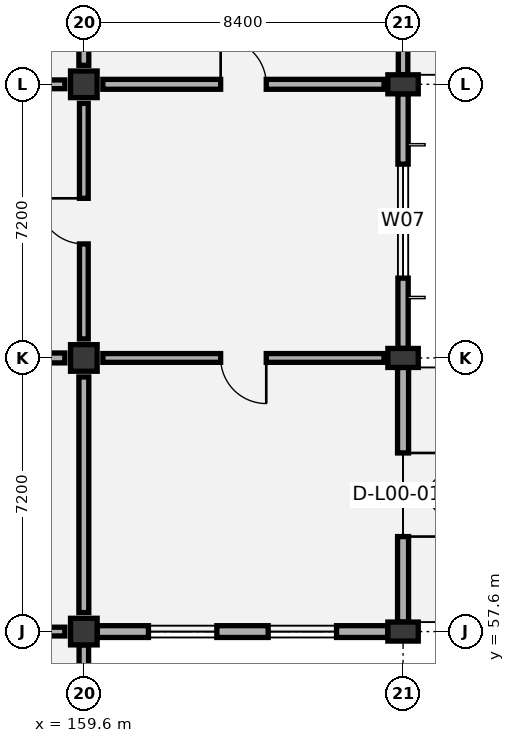
"""IFC4 building model, lengths in metres.
Left out: names, types, materials, properties, quantities, classifications, styles, units other than length and angle.
Written with IfcOpenShell. Run it as: python <this file> out.ifc"""

import sys

from ifc_helpers import new_model, si_unit, direction, frame, frame_2d, origin, origin_2d, place, context, subcontext, project, spatial, rectangle, extrude, element, fill, save


model = new_model("IFC4")
c1 = context("Model", 3, precision=1e-05, world=origin(), true_north=direction((0.0, 1.0)))
c2 = subcontext(c1, "Body", "Model", "MODEL_VIEW")
j1 = project(units=[si_unit("LENGTHUNIT", "METRE"), si_unit("PLANEANGLEUNIT", "RADIAN")], contexts=[c1])
p1 = place(None, origin())
s1 = spatial("IfcSite", under=j1, at=p1, CompositionType="ELEMENT")
p2 = place(p1, origin())
s2 = spatial("IfcBuilding", under=s1, at=p2, CompositionType="ELEMENT")
p3 = place(p2, origin())
s3 = spatial("IfcBuildingStorey", under=s2, at=p3, CompositionType="ELEMENT", Elevation=0.0)
for number, where, z_axis, x_axis in (
    (1, (159.6, 57.6, 0.0), (0.0, 0.0, 1.0), (1.0, 0.0, 0.0)),
    (2, (159.6, 64.8, 0.0), (0.0, 0.0, 1.0), (1.0, 0.0, 0.0)),
    (3, (159.6, 72.0, 0.0), (0.0, 0.0, 1.0), (1.0, 0.0, 0.0)),
):
    element("IfcColumn", number, at=place(p3, frame(where, z_axis=z_axis, x_axis=x_axis)), inside=s3, PredefinedType="COLUMN", context=c2, shape_type="SweptSolid", body=[
        extrude(rectangle(XDim=0.7, YDim=0.7, at=origin_2d()), origin(), (0.0, 0.0, 1.0), 6.0),
    ])
for number, where, z_axis, x_axis in (
    (4, (168.0, 57.6, 0.0), (0.0, 0.0, 1.0), (0.0, 1.0, 0.0)),
    (5, (168.0, 64.8, 0.0), (0.0, 0.0, 1.0), (0.0, 1.0, 0.0)),
    (6, (168.0, 72.0, 0.0), (0.0, 0.0, 1.0), (0.0, 1.0, 0.0)),
):
    element("IfcColumn", number, at=place(p3, frame(where, z_axis=z_axis, x_axis=x_axis)), inside=s3, PredefinedType="COLUMN", context=c2, shape_type="SweptSolid", body=[
        extrude(rectangle(XDim=0.5, YDim=0.8, at=origin_2d()), origin(), (0.0, 0.0, 1.0), 6.0),
    ])
p4 = place(p3, frame((159.6, 50.75, 0.0), z_axis=(0.0, 0.0, 1.0), x_axis=(0.0, 1.0, 0.0)))
e7 = element("IfcWall", 7, at=p4, inside=s3, PredefinedType="SOLIDWALL", context=c2, shape_type="SweptSolid", body=[
    extrude(rectangle(XDim=6.5, YDim=0.25, at=frame_2d((3.25, 0.0))), origin(), (0.0, 0.0, 1.0), 5.02),
])
p5 = place(p4, frame((0.967, 0.0, 0.9)))
e8 = element("IfcOpeningElement", 8, at=p5, cuts=e7, PredefinedType="OPENING", context=c2, shape_type="SweptSolid", body=[
    extrude(rectangle(XDim=1.8, YDim=2.1, at=frame_2d((0.9, 1.05))), frame((0.0, 0.135, 0.0), z_axis=(0.0, -1.0, 0.0), x_axis=(1.0, 0.0, 0.0)), (0.0, 0.0, 1.0), 0.27),
])
p6 = place(p4, frame((3.733, 0.0, 0.9)))
e9 = element("IfcOpeningElement", 9, at=p6, cuts=e7, PredefinedType="OPENING", context=c2, shape_type="SweptSolid", body=[
    extrude(rectangle(XDim=1.8, YDim=2.1, at=frame_2d((0.9, 1.05))), frame((0.0, 0.135, 0.0), z_axis=(0.0, -1.0, 0.0), x_axis=(1.0, 0.0, 0.0)), (0.0, 0.0, 1.0), 0.27),
])
p7 = place(p3, frame((159.95, 57.6, 0.0), z_axis=(0.0, 0.0, 1.0), x_axis=(1.0, 0.0, 0.0)))
e10 = element("IfcWall", 10, at=p7, inside=s3, PredefinedType="SOLIDWALL", context=c2, shape_type="SweptSolid", body=[
    extrude(rectangle(XDim=7.65, YDim=0.31, at=frame_2d((3.825, 0.0))), origin(), (0.0, 0.0, 1.0), 5.02),
])
p8 = place(p7, frame((1.35, 0.0, 0.9)))
e11 = element("IfcOpeningElement", 11, at=p8, cuts=e10, PredefinedType="OPENING", context=c2, shape_type="SweptSolid", body=[
    extrude(rectangle(XDim=1.8, YDim=2.1, at=frame_2d((0.9, 1.05))), frame((0.0, 0.165, 0.0), z_axis=(0.0, -1.0, 0.0), x_axis=(1.0, 0.0, 0.0)), (0.0, 0.0, 1.0), 0.33),
])
p9 = place(p7, frame((4.5, 0.0, 0.9)))
e12 = element("IfcOpeningElement", 12, at=p9, cuts=e10, PredefinedType="OPENING", context=c2, shape_type="SweptSolid", body=[
    extrude(rectangle(XDim=1.8, YDim=2.1, at=frame_2d((0.9, 1.05))), frame((0.0, 0.165, 0.0), z_axis=(0.0, -1.0, 0.0), x_axis=(1.0, 0.0, 0.0)), (0.0, 0.0, 1.0), 0.33),
])
p10 = place(p3, frame((168.0, 57.85, 0.0), z_axis=(0.0, 0.0, 1.0), x_axis=(0.0, 1.0, 0.0)))
e13 = element("IfcWall", 13, at=p10, inside=s3, PredefinedType="SOLIDWALL", context=c2, shape_type="SweptSolid", body=[
    extrude(rectangle(XDim=6.7, YDim=0.29, at=frame_2d((3.35, 0.0))), origin(), (0.0, 0.0, 1.0), 5.02),
])
p11 = place(p10, frame((2.25, 0.0, 0.0)))
e14 = element("IfcOpeningElement", 14, at=p11, cuts=e13, PredefinedType="OPENING", context=c2, shape_type="SweptSolid", body=[
    extrude(rectangle(XDim=2.2, YDim=2.45, at=frame_2d((1.1, 1.225))), frame((0.0, 0.155, 0.0), z_axis=(0.0, -1.0, 0.0), x_axis=(1.0, 0.0, 0.0)), (0.0, 0.0, 1.0), 0.31),
])
p12 = place(p3, frame((168.0, 65.05, 0.0), z_axis=(0.0, 0.0, 1.0), x_axis=(0.0, 1.0, 0.0)))
e15 = element("IfcWall", 15, at=p12, inside=s3, PredefinedType="SOLIDWALL", context=c2, shape_type="SweptSolid", body=[
    extrude(rectangle(XDim=6.7, YDim=0.27, at=frame_2d((3.35, 0.0))), origin(), (0.0, 0.0, 1.0), 5.02),
])
p13 = place(p12, frame((1.85, 0.0, 0.9)))
e16 = element("IfcOpeningElement", 16, at=p13, cuts=e15, PredefinedType="OPENING", context=c2, shape_type="SweptSolid", body=[
    extrude(rectangle(XDim=3.0, YDim=2.1, at=frame_2d((1.5, 1.05))), frame((0.0, 0.145, 0.0), z_axis=(0.0, -1.0, 0.0), x_axis=(1.0, 0.0, 0.0)), (0.0, 0.0, 1.0), 0.29),
])
p14 = place(p3, frame((168.0, 72.25, 0.0), z_axis=(0.0, 0.0, 1.0), x_axis=(0.0, 1.0, 0.0)))
e17 = element("IfcWall", 17, at=p14, inside=s3, PredefinedType="SOLIDWALL", context=c2, shape_type="SweptSolid", body=[
    extrude(rectangle(XDim=6.7, YDim=0.25, at=frame_2d((3.35, 0.0))), origin(), (0.0, 0.0, 1.0), 5.02),
])
p15 = place(p14, frame((2.35, 0.0, 0.0)))
e18 = element("IfcOpeningElement", 18, at=p15, cuts=e17, PredefinedType="OPENING", context=c2, shape_type="SweptSolid", body=[
    extrude(rectangle(XDim=2.0, YDim=2.4, at=frame_2d((1.0, 1.2))), frame((0.0, 0.135, 0.0), z_axis=(0.0, -1.0, 0.0), x_axis=(1.0, 0.0, 0.0)), (0.0, 0.0, 1.0), 0.27),
])
p16 = place(p3, frame((168.0, 50.52, 0.0), z_axis=(0.0, 0.0, 1.0), x_axis=(0.0, 1.0, 0.0)))
e19 = element("IfcWall", 19, at=p16, inside=s3, PredefinedType="PARAPET", context=c2, shape_type="SweptSolid", body=[
    extrude(rectangle(XDim=6.96, YDim=0.22, at=frame_2d((3.48, 0.0))), origin(), (0.0, 0.0, 1.0), 1.15),
])
p17 = place(p3, frame((151.7, 57.6, 0.0), z_axis=(0.0, 0.0, 1.0), x_axis=(1.0, 0.0, 0.0)))
e20 = element("IfcWall", 20, at=p17, inside=s3, PredefinedType="PARTITIONING", context=c2, shape_type="SweptSolid", body=[
    extrude(rectangle(XDim=7.4, YDim=0.23, at=frame_2d((3.7, 0.0))), origin(), (0.0, 0.0, 1.0), 4.87),
])
p18 = place(p17, frame((3.1, 0.0, 0.0)))
e21 = element("IfcOpeningElement", 21, at=p18, cuts=e20, PredefinedType="OPENING", context=c2, shape_type="SweptSolid", body=[
    extrude(rectangle(XDim=1.2, YDim=2.1, at=frame_2d((0.6, 1.05))), frame((0.0, 0.125, 0.0), z_axis=(0.0, -1.0, 0.0), x_axis=(1.0, 0.0, 0.0)), (0.0, 0.0, 1.0), 0.25),
])
p19 = place(p3, frame((159.6, 58.1, 0.0), z_axis=(0.0, 0.0, 1.0), x_axis=(0.0, 1.0, 0.0)))
e22 = element("IfcWall", 22, at=p19, inside=s3, PredefinedType="PARTITIONING", context=c2, shape_type="SweptSolid", body=[
    extrude(rectangle(XDim=6.2, YDim=0.26, at=frame_2d((3.1, 0.0))), origin(), (0.0, 0.0, 1.0), 4.92),
])
p20 = place(p3, frame((151.7, 64.8, 0.0), z_axis=(0.0, 0.0, 1.0), x_axis=(1.0, 0.0, 0.0)))
e23 = element("IfcWall", 23, at=p20, inside=s3, PredefinedType="PARTITIONING", context=c2, shape_type="SweptSolid", body=[
    extrude(rectangle(XDim=7.4, YDim=0.26, at=frame_2d((3.7, 0.0))), origin(), (0.0, 0.0, 1.0), 4.87),
])
p21 = place(p20, frame((3.1, 0.0, 0.0)))
e24 = element("IfcOpeningElement", 24, at=p21, cuts=e23, PredefinedType="OPENING", context=c2, shape_type="SweptSolid", body=[
    extrude(rectangle(XDim=1.2, YDim=2.1, at=frame_2d((0.6, 1.05))), frame((0.0, 0.14, 0.0), z_axis=(0.0, -1.0, 0.0), x_axis=(1.0, 0.0, 0.0)), (0.0, 0.0, 1.0), 0.28),
])
p22 = place(p3, frame((159.6, 65.3, 0.0), z_axis=(0.0, 0.0, 1.0), x_axis=(0.0, 1.0, 0.0)))
e25 = element("IfcWall", 25, at=p22, inside=s3, PredefinedType="PARTITIONING", context=c2, shape_type="SweptSolid", body=[
    extrude(rectangle(XDim=6.2, YDim=0.23, at=frame_2d((3.1, 0.0))), origin(), (0.0, 0.0, 1.0), 5.17),
])
p23 = place(p22, frame((2.5, 0.0, 0.0)))
e26 = element("IfcOpeningElement", 26, at=p23, cuts=e25, PredefinedType="OPENING", context=c2, shape_type="SweptSolid", body=[
    extrude(rectangle(XDim=1.2, YDim=2.1, at=frame_2d((0.6, 1.05))), frame((0.0, 0.125, 0.0), z_axis=(0.0, -1.0, 0.0), x_axis=(1.0, 0.0, 0.0)), (0.0, 0.0, 1.0), 0.25),
])
p24 = place(p3, frame((151.7, 72.0, 0.0), z_axis=(0.0, 0.0, 1.0), x_axis=(1.0, 0.0, 0.0)))
e27 = element("IfcWall", 27, at=p24, inside=s3, PredefinedType="PARTITIONING", context=c2, shape_type="SweptSolid", body=[
    extrude(rectangle(XDim=7.4, YDim=0.23, at=frame_2d((3.7, 0.0))), origin(), (0.0, 0.0, 1.0), 4.87),
])
p25 = place(p24, frame((3.1, 0.0, 0.0)))
e28 = element("IfcOpeningElement", 28, at=p25, cuts=e27, PredefinedType="OPENING", context=c2, shape_type="SweptSolid", body=[
    extrude(rectangle(XDim=1.2, YDim=2.1, at=frame_2d((0.6, 1.05))), frame((0.0, 0.125, 0.0), z_axis=(0.0, -1.0, 0.0), x_axis=(1.0, 0.0, 0.0)), (0.0, 0.0, 1.0), 0.25),
])
p26 = place(p3, frame((159.6, 72.5, 0.0), z_axis=(0.0, 0.0, 1.0), x_axis=(0.0, 1.0, 0.0)))
e29 = element("IfcWall", 29, at=p26, inside=s3, PredefinedType="PARTITIONING", context=c2, shape_type="SweptSolid", body=[
    extrude(rectangle(XDim=6.2, YDim=0.26, at=frame_2d((3.1, 0.0))), origin(), (0.0, 0.0, 1.0), 4.92),
])
p27 = place(p3, frame((160.1, 64.8, 0.0), z_axis=(0.0, 0.0, 1.0), x_axis=(1.0, 0.0, 0.0)))
e30 = element("IfcWall", 30, at=p27, inside=s3, PredefinedType="PARTITIONING", context=c2, shape_type="SweptSolid", body=[
    extrude(rectangle(XDim=7.4, YDim=0.23, at=frame_2d((3.7, 0.0))), origin(), (0.0, 0.0, 1.0), 4.87),
])
p28 = place(p27, frame((3.1, 0.0, 0.0)))
e31 = element("IfcOpeningElement", 31, at=p28, cuts=e30, PredefinedType="OPENING", context=c2, shape_type="SweptSolid", body=[
    extrude(rectangle(XDim=1.2, YDim=2.1, at=frame_2d((0.6, 1.05))), frame((0.0, 0.125, 0.0), z_axis=(0.0, -1.0, 0.0), x_axis=(1.0, 0.0, 0.0)), (0.0, 0.0, 1.0), 0.25),
])
p29 = place(p3, frame((160.1, 72.0, 0.0), z_axis=(0.0, 0.0, 1.0), x_axis=(1.0, 0.0, 0.0)))
e32 = element("IfcWall", 32, at=p29, inside=s3, PredefinedType="PARTITIONING", context=c2, shape_type="SweptSolid", body=[
    extrude(rectangle(XDim=7.4, YDim=0.26, at=frame_2d((3.7, 0.0))), origin(), (0.0, 0.0, 1.0), 4.87),
])
p30 = place(p29, frame((3.1, 0.0, 0.0)))
e33 = element("IfcOpeningElement", 33, at=p30, cuts=e32, PredefinedType="OPENING", context=c2, shape_type="SweptSolid", body=[
    extrude(rectangle(XDim=1.2, YDim=2.1, at=frame_2d((0.6, 1.05))), frame((0.0, 0.14, 0.0), z_axis=(0.0, -1.0, 0.0), x_axis=(1.0, 0.0, 0.0)), (0.0, 0.0, 1.0), 0.28),
])
p31 = place(p8, origin())
e34 = element("IfcWindow", 34, at=p31, inside=s3, PartitioningType="SINGLE_PANEL", PredefinedType="WINDOW", context=c2, shape_type="SweptSolid", body=[
    extrude(rectangle(XDim=1.8, YDim=2.1, at=frame_2d((0.9, 1.05))), frame((0.0, 0.03, 0.0), z_axis=(0.0, -1.0, 0.0), x_axis=(1.0, 0.0, 0.0)), (0.0, 0.0, 1.0), 0.06),
])
fill(e11, e34)
p32 = place(p9, origin())
e35 = element("IfcWindow", 35, at=p32, inside=s3, PartitioningType="SINGLE_PANEL", PredefinedType="WINDOW", context=c2, shape_type="SweptSolid", body=[
    extrude(rectangle(XDim=1.8, YDim=2.1, at=frame_2d((0.9, 1.05))), frame((0.0, 0.03, 0.0), z_axis=(0.0, -1.0, 0.0), x_axis=(1.0, 0.0, 0.0)), (0.0, 0.0, 1.0), 0.06),
])
fill(e12, e35)
p33 = place(p11, frame((2.2, 0.0, 0.0), z_axis=(0.0, 0.0, 1.0), x_axis=(-1.0, 0.0, 0.0)))
e36 = element("IfcDoor", 36, at=p33, inside=s3, OperationType="DOUBLE_DOOR_SINGLE_SWING", PredefinedType="DOOR", context=c2, shape_type="SweptSolid", body=[
    extrude(rectangle(XDim=2.2, YDim=2.45, at=frame_2d((1.1, 1.225))), frame((0.0, 0.025, 0.0), z_axis=(0.0, -1.0, 0.0), x_axis=(1.0, 0.0, 0.0)), (0.0, 0.0, 1.0), 0.05),
])
fill(e14, e36)
p34 = place(p13, origin())
e37 = element("IfcWindow", 37, at=p34, inside=s3, PartitioningType="SINGLE_PANEL", PredefinedType="WINDOW", context=c2, shape_type="SweptSolid", body=[
    extrude(rectangle(XDim=3.0, YDim=2.1, at=frame_2d((1.5, 1.05))), frame((0.0, 0.03, 0.0), z_axis=(0.0, -1.0, 0.0), x_axis=(1.0, 0.0, 0.0)), (0.0, 0.0, 1.0), 0.06),
])
fill(e16, e37)
p35 = place(p23, origin())
e38 = element("IfcDoor", 38, at=p35, inside=s3, OperationType="SINGLE_SWING_RIGHT", PredefinedType="DOOR", context=c2, shape_type="SweptSolid", body=[
    extrude(rectangle(XDim=1.2, YDim=2.1, at=frame_2d((0.6, 1.05))), frame((0.0, 0.025, 0.0), z_axis=(0.0, -1.0, 0.0), x_axis=(1.0, 0.0, 0.0)), (0.0, 0.0, 1.0), 0.05),
])
fill(e26, e38)
p36 = place(p28, frame((1.2, 0.0, 0.0), z_axis=(0.0, 0.0, 1.0), x_axis=(-1.0, 0.0, 0.0)))
e39 = element("IfcDoor", 39, at=p36, inside=s3, OperationType="SINGLE_SWING_LEFT", PredefinedType="DOOR", context=c2, shape_type="SweptSolid", body=[
    extrude(rectangle(XDim=1.2, YDim=2.1, at=frame_2d((0.6, 1.05))), frame((0.0, 0.025, 0.0), z_axis=(0.0, -1.0, 0.0), x_axis=(1.0, 0.0, 0.0)), (0.0, 0.0, 1.0), 0.05),
])
fill(e31, e39)
p37 = place(p30, origin())
e40 = element("IfcDoor", 40, at=p37, inside=s3, OperationType="SINGLE_SWING_LEFT", PredefinedType="DOOR", context=c2, shape_type="SweptSolid", body=[
    extrude(rectangle(XDim=1.2, YDim=2.1, at=frame_2d((0.6, 1.05))), frame((0.0, 0.025, 0.0), z_axis=(0.0, -1.0, 0.0), x_axis=(1.0, 0.0, 0.0)), (0.0, 0.0, 1.0), 0.05),
])
fill(e33, e40)
save(model, sys.argv[1])
